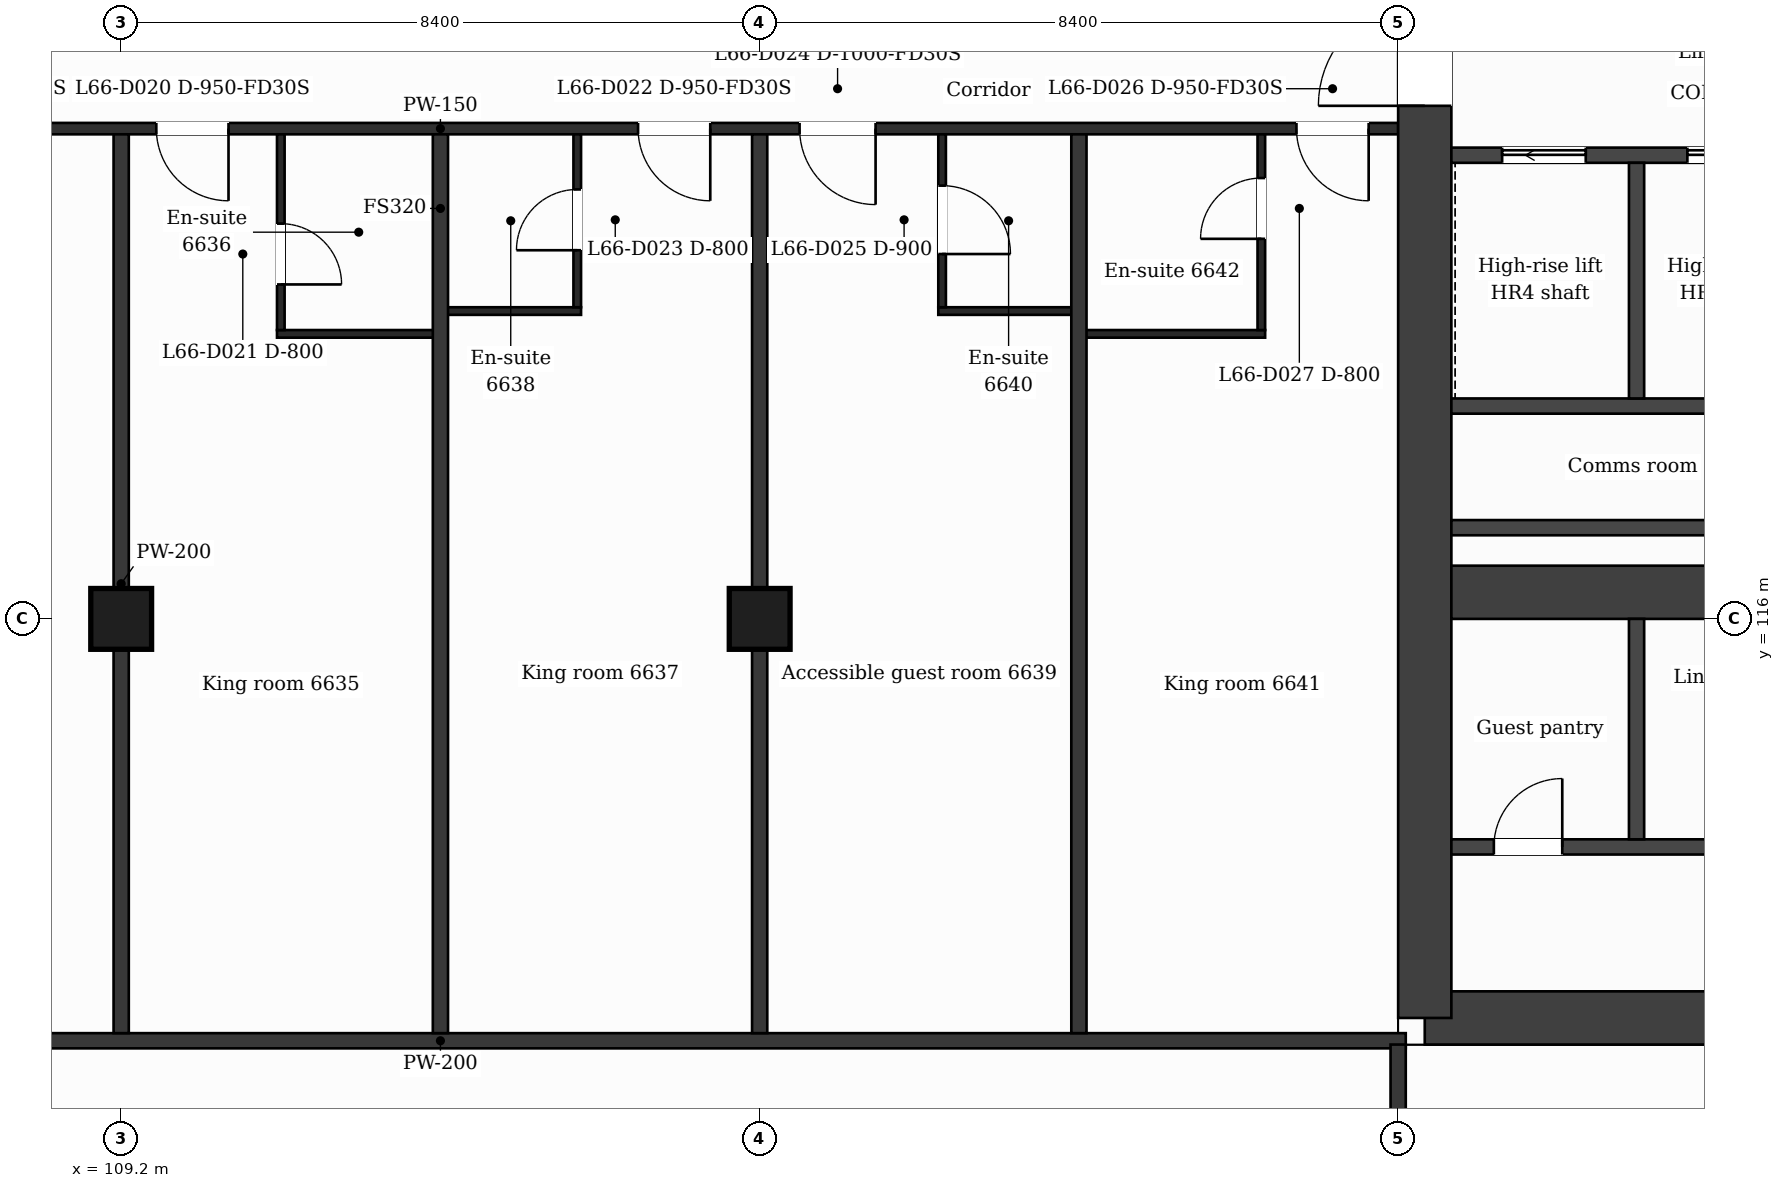
"""IFC4 building model, lengths in metres.
Left out: names, types, materials, properties, quantities, classifications, styles, units other than length and angle.
Written with IfcOpenShell. Run it as: python <this file> out.ifc"""

import sys

from ifc_helpers import new_model, si_unit, direction, frame, frame_2d, origin, origin_2d, place, context, subcontext, project, spatial, rectangle, extrude, element, fill, save


model = new_model("IFC4")
c1 = context("Model", 3, precision=1e-05, world=origin(), true_north=direction((0.0, 1.0)))
c2 = subcontext(c1, "Body", "Model", "MODEL_VIEW")
j1 = project(units=[si_unit("LENGTHUNIT", "METRE"), si_unit("PLANEANGLEUNIT", "RADIAN")], contexts=[c1])
p1 = place(None, origin())
s1 = spatial("IfcSite", under=j1, at=p1, CompositionType="ELEMENT")
p2 = place(p1, origin())
s2 = spatial("IfcBuilding", under=s1, at=p2, CompositionType="ELEMENT")
p3 = place(p2, frame((0.0, 0.0, 273.8)))
s3 = spatial("IfcBuildingStorey", under=s2, at=p3, CompositionType="ELEMENT", Elevation=273.8)
p4 = place(p3, frame((140.73, 110.75, 0.0), z_axis=(0.0, 0.0, 1.0), x_axis=(-1.0, 0.0, 0.0)))
e1 = element("IfcWall", 1, at=p4, inside=s3, PredefinedType="SHEAR", context=c2, shape_type="SweptSolid", body=[
    extrude(rectangle(XDim=14.38, YDim=0.7, at=frame_2d((7.19, 0.0))), origin(), (0.0, 0.0, 1.0), 3.7),
])
p5 = place(p4, frame((7.12, 0.0, 0.0)))
e2 = element("IfcOpeningElement", 2, at=p5, cuts=e1, PredefinedType="OPENING", context=c2, shape_type="SweptSolid", body=[
    extrude(rectangle(XDim=1.2, YDim=2.1, at=frame_2d((0.6, 1.05))), frame((0.0, 0.36, 0.0), z_axis=(0.0, -1.0, 0.0), x_axis=(1.0, 0.0, 0.0)), (0.0, 0.0, 1.0), 0.72),
])
p6 = place(p3, frame((126.35, 110.75, 0.0), z_axis=(0.0, 0.0, 1.0), x_axis=(0.0, 1.0, 0.0)))
e3 = element("IfcWall", 3, at=p6, inside=s3, PredefinedType="SHEAR", context=c2, shape_type="SweptSolid", body=[
    extrude(rectangle(XDim=21.3, YDim=0.7, at=frame_2d((10.65, 0.0))), origin(), (0.0, 0.0, 1.0), 3.7),
])
p7 = place(p6, frame((12.0, 0.0, 0.0)))
e4 = element("IfcOpeningElement", 4, at=p7, cuts=e3, PredefinedType="OPENING", context=c2, shape_type="SweptSolid", body=[
    extrude(rectangle(XDim=1.4, YDim=2.1, at=frame_2d((0.7, 1.05))), frame((0.0, 0.36, 0.0), z_axis=(0.0, -1.0, 0.0), x_axis=(1.0, 0.0, 0.0)), (0.0, 0.0, 1.0), 0.72),
])
p8 = place(p3, frame((126.7, 116.35, 0.0), z_axis=(0.0, 0.0, 1.0), x_axis=(1.0, 0.0, 0.0)))
e5 = element("IfcWall", 5, at=p8, inside=s3, PredefinedType="SHEAR", context=c2, shape_type="SweptSolid", body=[
    extrude(rectangle(XDim=5.5, YDim=0.7, at=frame_2d((2.75, 0.0))), origin(), (0.0, 0.0, 1.0), 3.7),
])
for number, where, z_axis, x_axis in (
    (6, (109.2, 116.0, 0.0), (0.0, 0.0, 1.0), (1.0, 0.0, 0.0)),
    (7, (117.6, 116.0, 0.0), (0.0, 0.0, 1.0), (1.0, 0.0, 0.0)),
):
    element("IfcColumn", number, at=place(p3, frame(where, z_axis=z_axis, x_axis=x_axis)), inside=s3, PredefinedType="COLUMN", context=c2, shape_type="SweptSolid", body=[
        extrude(rectangle(XDim=0.8, YDim=0.8, at=origin_2d()), origin(), (0.0, 0.0, 1.0), 3.7),
    ])
p9 = place(p3, frame((100.7, 110.45, 0.0), z_axis=(0.0, 0.0, 1.0), x_axis=(1.0, 0.0, 0.0)))
e8 = element("IfcWall", 8, at=p9, inside=s3, PredefinedType="PARTITIONING", context=c2, shape_type="SweptSolid", body=[
    extrude(rectangle(XDim=25.4, YDim=0.2, at=frame_2d((12.7, 0.0))), origin(), (0.0, 0.0, 1.0), 3.38),
])
p10 = place(p3, frame((126.7, 113.0, 0.0), z_axis=(0.0, 0.0, 1.0), x_axis=(1.0, 0.0, 0.0)))
e9 = element("IfcWall", 9, at=p10, inside=s3, PredefinedType="PARTITIONING", context=c2, shape_type="SweptSolid", body=[
    extrude(rectangle(XDim=4.973, YDim=0.2, at=frame_2d((2.487, 0.0))), origin(), (0.0, 0.0, 1.0), 3.38),
])
p11 = place(p10, frame((0.559, 0.0, 0.0)))
e10 = element("IfcOpeningElement", 10, at=p11, cuts=e9, PredefinedType="OPENING", context=c2, shape_type="SweptSolid", body=[
    extrude(rectangle(XDim=0.9, YDim=2.1, at=frame_2d((0.45, 1.05))), frame((0.0, 0.11, 0.0), z_axis=(0.0, -1.0, 0.0), x_axis=(1.0, 0.0, 0.0)), (0.0, 0.0, 1.0), 0.22),
])
for number, where, z_axis, x_axis in (
    (11, (126.7, 117.2, 0.0), (0.0, 0.0, 1.0), (1.0, 0.0, 0.0)),
    (12, (126.7, 118.8, 0.0), (0.0, 0.0, 1.0), (1.0, 0.0, 0.0)),
):
    element("IfcWall", number, at=place(p3, frame(where, z_axis=z_axis, x_axis=x_axis)), inside=s3, PredefinedType="PARTITIONING", context=c2, shape_type="SweptSolid", body=[
        extrude(rectangle(XDim=4.873, YDim=0.2, at=frame_2d((2.437, 0.0))), origin(), (0.0, 0.0, 1.0), 3.38),
    ])
p12 = place(p3, frame((111.25, 119.75, 0.0), z_axis=(0.0, 0.0, 1.0), x_axis=(1.0, 0.0, 0.0)))
e13 = element("IfcWall", 13, at=p12, inside=s3, PredefinedType="PARTITIONING", context=c2, shape_type="SweptSolid", body=[
    extrude(rectangle(XDim=2.15, YDim=0.1, at=frame_2d((1.075, 0.0))), origin(), (0.0, 0.0, 1.0), 3.38),
])
p13 = place(p3, frame((121.8, 119.75, 0.0), z_axis=(0.0, 0.0, 1.0), x_axis=(1.0, 0.0, 0.0)))
e14 = element("IfcWall", 14, at=p13, inside=s3, PredefinedType="PARTITIONING", context=c2, shape_type="SweptSolid", body=[
    extrude(rectangle(XDim=2.45, YDim=0.1, at=frame_2d((1.225, 0.0))), origin(), (0.0, 0.0, 1.0), 3.38),
])
for number, where, z_axis, x_axis in (
    (15, (113.4, 120.05, 0.0), (0.0, 0.0, 1.0), (1.0, 0.0, 0.0)),
    (16, (119.95, 120.05, 0.0), (0.0, 0.0, 1.0), (1.0, 0.0, 0.0)),
):
    element("IfcWall", number, at=place(p3, frame(where, z_axis=z_axis, x_axis=x_axis)), inside=s3, PredefinedType="PARTITIONING", context=c2, shape_type="SweptSolid", body=[
        extrude(rectangle(XDim=1.85, YDim=0.1, at=frame_2d((0.925, 0.0))), origin(), (0.0, 0.0, 1.0), 3.38),
    ])
p14 = place(p3, frame((126.7, 122.1, 0.0), z_axis=(0.0, 0.0, 1.0), x_axis=(1.0, 0.0, 0.0)))
e17 = element("IfcWall", 17, at=p14, inside=s3, PredefinedType="PARTITIONING", context=c2, shape_type="SweptSolid", body=[
    extrude(rectangle(XDim=4.873, YDim=0.2, at=frame_2d((2.437, 0.0))), origin(), (0.0, 0.0, 1.0), 3.38),
])
p15 = place(p14, frame((3.105, 0.0, 0.0)))
e18 = element("IfcOpeningElement", 18, at=p15, cuts=e17, PredefinedType="OPENING", context=c2, shape_type="SweptSolid", body=[
    extrude(rectangle(XDim=1.1, YDim=2.1, at=frame_2d((0.55, 1.05))), frame((0.0, 0.11, 0.0), z_axis=(0.0, -1.0, 0.0), x_axis=(1.0, 0.0, 0.0)), (0.0, 0.0, 1.0), 0.22),
])
p16 = place(p14, frame((0.668, 0.0, 0.0)))
e19 = element("IfcOpeningElement", 19, at=p16, cuts=e17, PredefinedType="OPENING", context=c2, shape_type="SweptSolid", body=[
    extrude(rectangle(XDim=1.1, YDim=2.1, at=frame_2d((0.55, 1.05))), frame((0.0, 0.11, 0.0), z_axis=(0.0, -1.0, 0.0), x_axis=(1.0, 0.0, 0.0)), (0.0, 0.0, 1.0), 0.22),
])
p17 = place(p3, frame((100.8, 122.45, 0.0), z_axis=(0.0, 0.0, 1.0), x_axis=(1.0, 0.0, 0.0)))
e20 = element("IfcWall", 20, at=p17, inside=s3, PredefinedType="PARTITIONING", context=c2, shape_type="SweptSolid", body=[
    extrude(rectangle(XDim=25.2, YDim=0.15, at=frame_2d((12.6, 0.0))), origin(), (0.0, 0.0, 1.0), 3.38),
])
p18 = place(p17, frame((5.55, 0.0, 0.0)))
e21 = element("IfcOpeningElement", 21, at=p18, cuts=e20, PredefinedType="OPENING", context=c2, shape_type="SweptSolid", body=[
    extrude(rectangle(XDim=1.0, YDim=2.1, at=frame_2d((0.5, 1.05))), frame((0.0, 0.085, 0.0), z_axis=(0.0, -1.0, 0.0), x_axis=(1.0, 0.0, 0.0)), (0.0, 0.0, 1.0), 0.17),
])
p19 = place(p17, frame((8.862, 0.0, 0.0)))
e22 = element("IfcOpeningElement", 22, at=p19, cuts=e20, PredefinedType="OPENING", context=c2, shape_type="SweptSolid", body=[
    extrude(rectangle(XDim=0.95, YDim=2.1, at=frame_2d((0.475, 1.05))), frame((0.0, 0.085, 0.0), z_axis=(0.0, -1.0, 0.0), x_axis=(1.0, 0.0, 0.0)), (0.0, 0.0, 1.0), 0.17),
])
p20 = place(p17, frame((15.2, 0.0, 0.0)))
e23 = element("IfcOpeningElement", 23, at=p20, cuts=e20, PredefinedType="OPENING", context=c2, shape_type="SweptSolid", body=[
    extrude(rectangle(XDim=0.95, YDim=2.1, at=frame_2d((0.475, 1.05))), frame((0.0, 0.085, 0.0), z_axis=(0.0, -1.0, 0.0), x_axis=(1.0, 0.0, 0.0)), (0.0, 0.0, 1.0), 0.17),
])
p21 = place(p17, frame((17.325, 0.0, 0.0)))
e24 = element("IfcOpeningElement", 24, at=p21, cuts=e20, PredefinedType="OPENING", context=c2, shape_type="SweptSolid", body=[
    extrude(rectangle(XDim=1.0, YDim=2.1, at=frame_2d((0.5, 1.05))), frame((0.0, 0.085, 0.0), z_axis=(0.0, -1.0, 0.0), x_axis=(1.0, 0.0, 0.0)), (0.0, 0.0, 1.0), 0.17),
])
p22 = place(p17, frame((23.862, 0.0, 0.0)))
e25 = element("IfcOpeningElement", 25, at=p22, cuts=e20, PredefinedType="OPENING", context=c2, shape_type="SweptSolid", body=[
    extrude(rectangle(XDim=0.95, YDim=2.1, at=frame_2d((0.475, 1.05))), frame((0.0, 0.085, 0.0), z_axis=(0.0, -1.0, 0.0), x_axis=(1.0, 0.0, 0.0)), (0.0, 0.0, 1.0), 0.17),
])
p23 = place(p3, frame((109.2, 110.55, 0.0), z_axis=(0.0, 0.0, 1.0), x_axis=(0.0, 1.0, 0.0)))
e26 = element("IfcWall", 26, at=p23, inside=s3, PredefinedType="PARTITIONING", context=c2, shape_type="SweptSolid", body=[
    extrude(rectangle(XDim=11.825, YDim=0.2, at=frame_2d((5.913, 0.0))), origin(), (0.0, 0.0, 1.0), 3.38),
])
p24 = place(p3, frame((111.3, 119.8, 0.0), z_axis=(0.0, 0.0, 1.0), x_axis=(0.0, 1.0, 0.0)))
e27 = element("IfcWall", 27, at=p24, inside=s3, PredefinedType="PARTITIONING", context=c2, shape_type="SweptSolid", body=[
    extrude(rectangle(XDim=2.575, YDim=0.1, at=frame_2d((1.288, 0.0))), origin(), (0.0, 0.0, 1.0), 3.38),
])
p25 = place(p24, frame((0.6, 0.0, 0.0)))
e28 = element("IfcOpeningElement", 28, at=p25, cuts=e27, PredefinedType="OPENING", context=c2, shape_type="SweptSolid", body=[
    extrude(rectangle(XDim=0.8, YDim=2.1, at=frame_2d((0.4, 1.05))), frame((0.0, 0.06, 0.0), z_axis=(0.0, -1.0, 0.0), x_axis=(1.0, 0.0, 0.0)), (0.0, 0.0, 1.0), 0.12),
])
p26 = place(p3, frame((113.4, 110.55, 0.0), z_axis=(0.0, 0.0, 1.0), x_axis=(0.0, 1.0, 0.0)))
e29 = element("IfcWall", 29, at=p26, inside=s3, PredefinedType="PARTITIONING", context=c2, shape_type="SweptSolid", body=[
    extrude(rectangle(XDim=11.825, YDim=0.2, at=frame_2d((5.913, 0.0))), origin(), (0.0, 0.0, 1.0), 3.38),
])
p27 = place(p3, frame((115.2, 120.1, 0.0), z_axis=(0.0, 0.0, 1.0), x_axis=(0.0, 1.0, 0.0)))
e30 = element("IfcWall", 30, at=p27, inside=s3, PredefinedType="PARTITIONING", context=c2, shape_type="SweptSolid", body=[
    extrude(rectangle(XDim=2.275, YDim=0.1, at=frame_2d((1.137, 0.0))), origin(), (0.0, 0.0, 1.0), 3.38),
])
p28 = place(p27, frame((0.75, 0.0, 0.0)))
e31 = element("IfcOpeningElement", 31, at=p28, cuts=e30, PredefinedType="OPENING", context=c2, shape_type="SweptSolid", body=[
    extrude(rectangle(XDim=0.8, YDim=2.1, at=frame_2d((0.4, 1.05))), frame((0.0, 0.06, 0.0), z_axis=(0.0, -1.0, 0.0), x_axis=(1.0, 0.0, 0.0)), (0.0, 0.0, 1.0), 0.12),
])
p29 = place(p3, frame((117.6, 110.55, 0.0), z_axis=(0.0, 0.0, 1.0), x_axis=(0.0, 1.0, 0.0)))
e32 = element("IfcWall", 32, at=p29, inside=s3, PredefinedType="PARTITIONING", context=c2, shape_type="SweptSolid", body=[
    extrude(rectangle(XDim=11.825, YDim=0.2, at=frame_2d((5.913, 0.0))), origin(), (0.0, 0.0, 1.0), 3.38),
])
p30 = place(p3, frame((120.0, 120.1, 0.0), z_axis=(0.0, 0.0, 1.0), x_axis=(0.0, 1.0, 0.0)))
e33 = element("IfcWall", 33, at=p30, inside=s3, PredefinedType="PARTITIONING", context=c2, shape_type="SweptSolid", body=[
    extrude(rectangle(XDim=2.275, YDim=0.1, at=frame_2d((1.137, 0.0))), origin(), (0.0, 0.0, 1.0), 3.38),
])
p31 = place(p30, frame((0.7, 0.0, 0.0)))
e34 = element("IfcOpeningElement", 34, at=p31, cuts=e33, PredefinedType="OPENING", context=c2, shape_type="SweptSolid", body=[
    extrude(rectangle(XDim=0.9, YDim=2.1, at=frame_2d((0.45, 1.05))), frame((0.0, 0.06, 0.0), z_axis=(0.0, -1.0, 0.0), x_axis=(1.0, 0.0, 0.0)), (0.0, 0.0, 1.0), 0.12),
])
p32 = place(p3, frame((121.8, 110.55, 0.0), z_axis=(0.0, 0.0, 1.0), x_axis=(0.0, 1.0, 0.0)))
e35 = element("IfcWall", 35, at=p32, inside=s3, PredefinedType="PARTITIONING", context=c2, shape_type="SweptSolid", body=[
    extrude(rectangle(XDim=11.825, YDim=0.2, at=frame_2d((5.913, 0.0))), origin(), (0.0, 0.0, 1.0), 3.38),
])
p33 = place(p3, frame((124.2, 119.8, 0.0), z_axis=(0.0, 0.0, 1.0), x_axis=(0.0, 1.0, 0.0)))
e36 = element("IfcWall", 36, at=p33, inside=s3, PredefinedType="PARTITIONING", context=c2, shape_type="SweptSolid", body=[
    extrude(rectangle(XDim=2.575, YDim=0.1, at=frame_2d((1.288, 0.0))), origin(), (0.0, 0.0, 1.0), 3.38),
])
p34 = place(p33, frame((1.2, 0.0, 0.0)))
e37 = element("IfcOpeningElement", 37, at=p34, cuts=e36, PredefinedType="OPENING", context=c2, shape_type="SweptSolid", body=[
    extrude(rectangle(XDim=0.8, YDim=2.1, at=frame_2d((0.4, 1.05))), frame((0.0, 0.06, 0.0), z_axis=(0.0, -1.0, 0.0), x_axis=(1.0, 0.0, 0.0)), (0.0, 0.0, 1.0), 0.12),
])
p35 = place(p3, frame((126.0, 108.79, 0.0), z_axis=(0.0, 0.0, 1.0), x_axis=(0.0, 1.0, 0.0)))
e38 = element("IfcWall", 38, at=p35, inside=s3, PredefinedType="PARTITIONING", context=c2, shape_type="SweptSolid", body=[
    extrude(rectangle(XDim=1.61, YDim=0.2, at=frame_2d((0.805, 0.0))), origin(), (0.0, 0.0, 1.0), 3.38),
])
p36 = place(p3, frame((129.136, 113.1, 0.0), z_axis=(0.0, 0.0, 1.0), x_axis=(0.0, 1.0, 0.0)))
e39 = element("IfcWall", 39, at=p36, inside=s3, PredefinedType="PARTITIONING", context=c2, shape_type="SweptSolid", body=[
    extrude(rectangle(XDim=2.9, YDim=0.2, at=frame_2d((1.45, 0.0))), origin(), (0.0, 0.0, 1.0), 3.38),
])
p37 = place(p3, frame((129.136, 118.9, 0.0), z_axis=(0.0, 0.0, 1.0), x_axis=(0.0, 1.0, 0.0)))
e40 = element("IfcWall", 40, at=p37, inside=s3, PredefinedType="PARTITIONING", context=c2, shape_type="SweptSolid", body=[
    extrude(rectangle(XDim=3.1, YDim=0.2, at=frame_2d((1.55, 0.0))), origin(), (0.0, 0.0, 1.0), 3.38),
])
p38 = place(p15, origin())
e41 = element("IfcDoor", 41, at=p38, inside=s3, OperationType="SLIDING_TO_LEFT", PredefinedType="DOOR", context=c2, shape_type="SweptSolid", body=[
    extrude(rectangle(XDim=1.1, YDim=2.1, at=frame_2d((0.55, 1.05))), frame((0.0, 0.025, 0.0), z_axis=(0.0, -1.0, 0.0), x_axis=(1.0, 0.0, 0.0)), (0.0, 0.0, 1.0), 0.05),
])
fill(e18, e41)
p39 = place(p16, origin())
e42 = element("IfcDoor", 42, at=p39, inside=s3, OperationType="SLIDING_TO_LEFT", PredefinedType="DOOR", context=c2, shape_type="SweptSolid", body=[
    extrude(rectangle(XDim=1.1, YDim=2.1, at=frame_2d((0.55, 1.05))), frame((0.0, 0.025, 0.0), z_axis=(0.0, -1.0, 0.0), x_axis=(1.0, 0.0, 0.0)), (0.0, 0.0, 1.0), 0.05),
])
fill(e19, e42)
p40 = place(p11, origin())
e43 = element("IfcDoor", 43, at=p40, inside=s3, OperationType="SINGLE_SWING_RIGHT", PredefinedType="DOOR", context=c2, shape_type="SweptSolid", body=[
    extrude(rectangle(XDim=0.9, YDim=2.1, at=frame_2d((0.45, 1.05))), frame((0.0, 0.025, 0.0), z_axis=(0.0, -1.0, 0.0), x_axis=(1.0, 0.0, 0.0)), (0.0, 0.0, 1.0), 0.05),
])
fill(e10, e43)
p41 = place(p19, origin())
e44 = element("IfcDoor", 44, at=p41, inside=s3, OperationType="SINGLE_SWING_RIGHT", PredefinedType="DOOR", context=c2, shape_type="SweptSolid", body=[
    extrude(rectangle(XDim=0.95, YDim=2.1, at=frame_2d((0.475, 1.05))), frame((0.0, 0.025, 0.0), z_axis=(0.0, -1.0, 0.0), x_axis=(1.0, 0.0, 0.0)), (0.0, 0.0, 1.0), 0.05),
])
fill(e22, e44)
p42 = place(p25, origin())
e45 = element("IfcDoor", 45, at=p42, inside=s3, OperationType="SINGLE_SWING_LEFT", PredefinedType="DOOR", context=c2, shape_type="SweptSolid", body=[
    extrude(rectangle(XDim=0.8, YDim=2.1, at=frame_2d((0.4, 1.05))), frame((0.0, 0.025, 0.0), z_axis=(0.0, -1.0, 0.0), x_axis=(1.0, 0.0, 0.0)), (0.0, 0.0, 1.0), 0.05),
])
fill(e28, e45)
p43 = place(p20, origin())
e46 = element("IfcDoor", 46, at=p43, inside=s3, OperationType="SINGLE_SWING_RIGHT", PredefinedType="DOOR", context=c2, shape_type="SweptSolid", body=[
    extrude(rectangle(XDim=0.95, YDim=2.1, at=frame_2d((0.475, 1.05))), frame((0.0, 0.025, 0.0), z_axis=(0.0, -1.0, 0.0), x_axis=(1.0, 0.0, 0.0)), (0.0, 0.0, 1.0), 0.05),
])
fill(e23, e46)
p44 = place(p28, origin())
e47 = element("IfcDoor", 47, at=p44, inside=s3, OperationType="SINGLE_SWING_LEFT", PredefinedType="DOOR", context=c2, shape_type="SweptSolid", body=[
    extrude(rectangle(XDim=0.8, YDim=2.1, at=frame_2d((0.4, 1.05))), frame((0.0, 0.025, 0.0), z_axis=(0.0, -1.0, 0.0), x_axis=(1.0, 0.0, 0.0)), (0.0, 0.0, 1.0), 0.05),
])
fill(e31, e47)
p45 = place(p21, origin())
e48 = element("IfcDoor", 48, at=p45, inside=s3, OperationType="SINGLE_SWING_RIGHT", PredefinedType="DOOR", context=c2, shape_type="SweptSolid", body=[
    extrude(rectangle(XDim=1.0, YDim=2.1, at=frame_2d((0.5, 1.05))), frame((0.0, 0.025, 0.0), z_axis=(0.0, -1.0, 0.0), x_axis=(1.0, 0.0, 0.0)), (0.0, 0.0, 1.0), 0.05),
])
fill(e24, e48)
p46 = place(p31, origin())
e49 = element("IfcDoor", 49, at=p46, inside=s3, OperationType="SINGLE_SWING_LEFT", PredefinedType="DOOR", context=c2, shape_type="SweptSolid", body=[
    extrude(rectangle(XDim=0.9, YDim=2.1, at=frame_2d((0.45, 1.05))), frame((0.0, 0.025, 0.0), z_axis=(0.0, -1.0, 0.0), x_axis=(1.0, 0.0, 0.0)), (0.0, 0.0, 1.0), 0.05),
])
fill(e34, e49)
p47 = place(p22, origin())
e50 = element("IfcDoor", 50, at=p47, inside=s3, OperationType="SINGLE_SWING_RIGHT", PredefinedType="DOOR", context=c2, shape_type="SweptSolid", body=[
    extrude(rectangle(XDim=0.95, YDim=2.1, at=frame_2d((0.475, 1.05))), frame((0.0, 0.025, 0.0), z_axis=(0.0, -1.0, 0.0), x_axis=(1.0, 0.0, 0.0)), (0.0, 0.0, 1.0), 0.05),
])
fill(e25, e50)
p48 = place(p34, origin())
e51 = element("IfcDoor", 51, at=p48, inside=s3, OperationType="SINGLE_SWING_LEFT", PredefinedType="DOOR", context=c2, shape_type="SweptSolid", body=[
    extrude(rectangle(XDim=0.8, YDim=2.1, at=frame_2d((0.4, 1.05))), frame((0.0, 0.025, 0.0), z_axis=(0.0, -1.0, 0.0), x_axis=(1.0, 0.0, 0.0)), (0.0, 0.0, 1.0), 0.05),
])
fill(e37, e51)
p49 = place(p7, origin())
e52 = element("IfcDoor", 52, at=p49, inside=s3, OperationType="SINGLE_SWING_LEFT", PredefinedType="DOOR", context=c2, shape_type="SweptSolid", body=[
    extrude(rectangle(XDim=1.4, YDim=2.1, at=frame_2d((0.7, 1.05))), frame((0.0, 0.025, 0.0), z_axis=(0.0, -1.0, 0.0), x_axis=(1.0, 0.0, 0.0)), (0.0, 0.0, 1.0), 0.05),
])
fill(e4, e52)
save(model, sys.argv[1])
